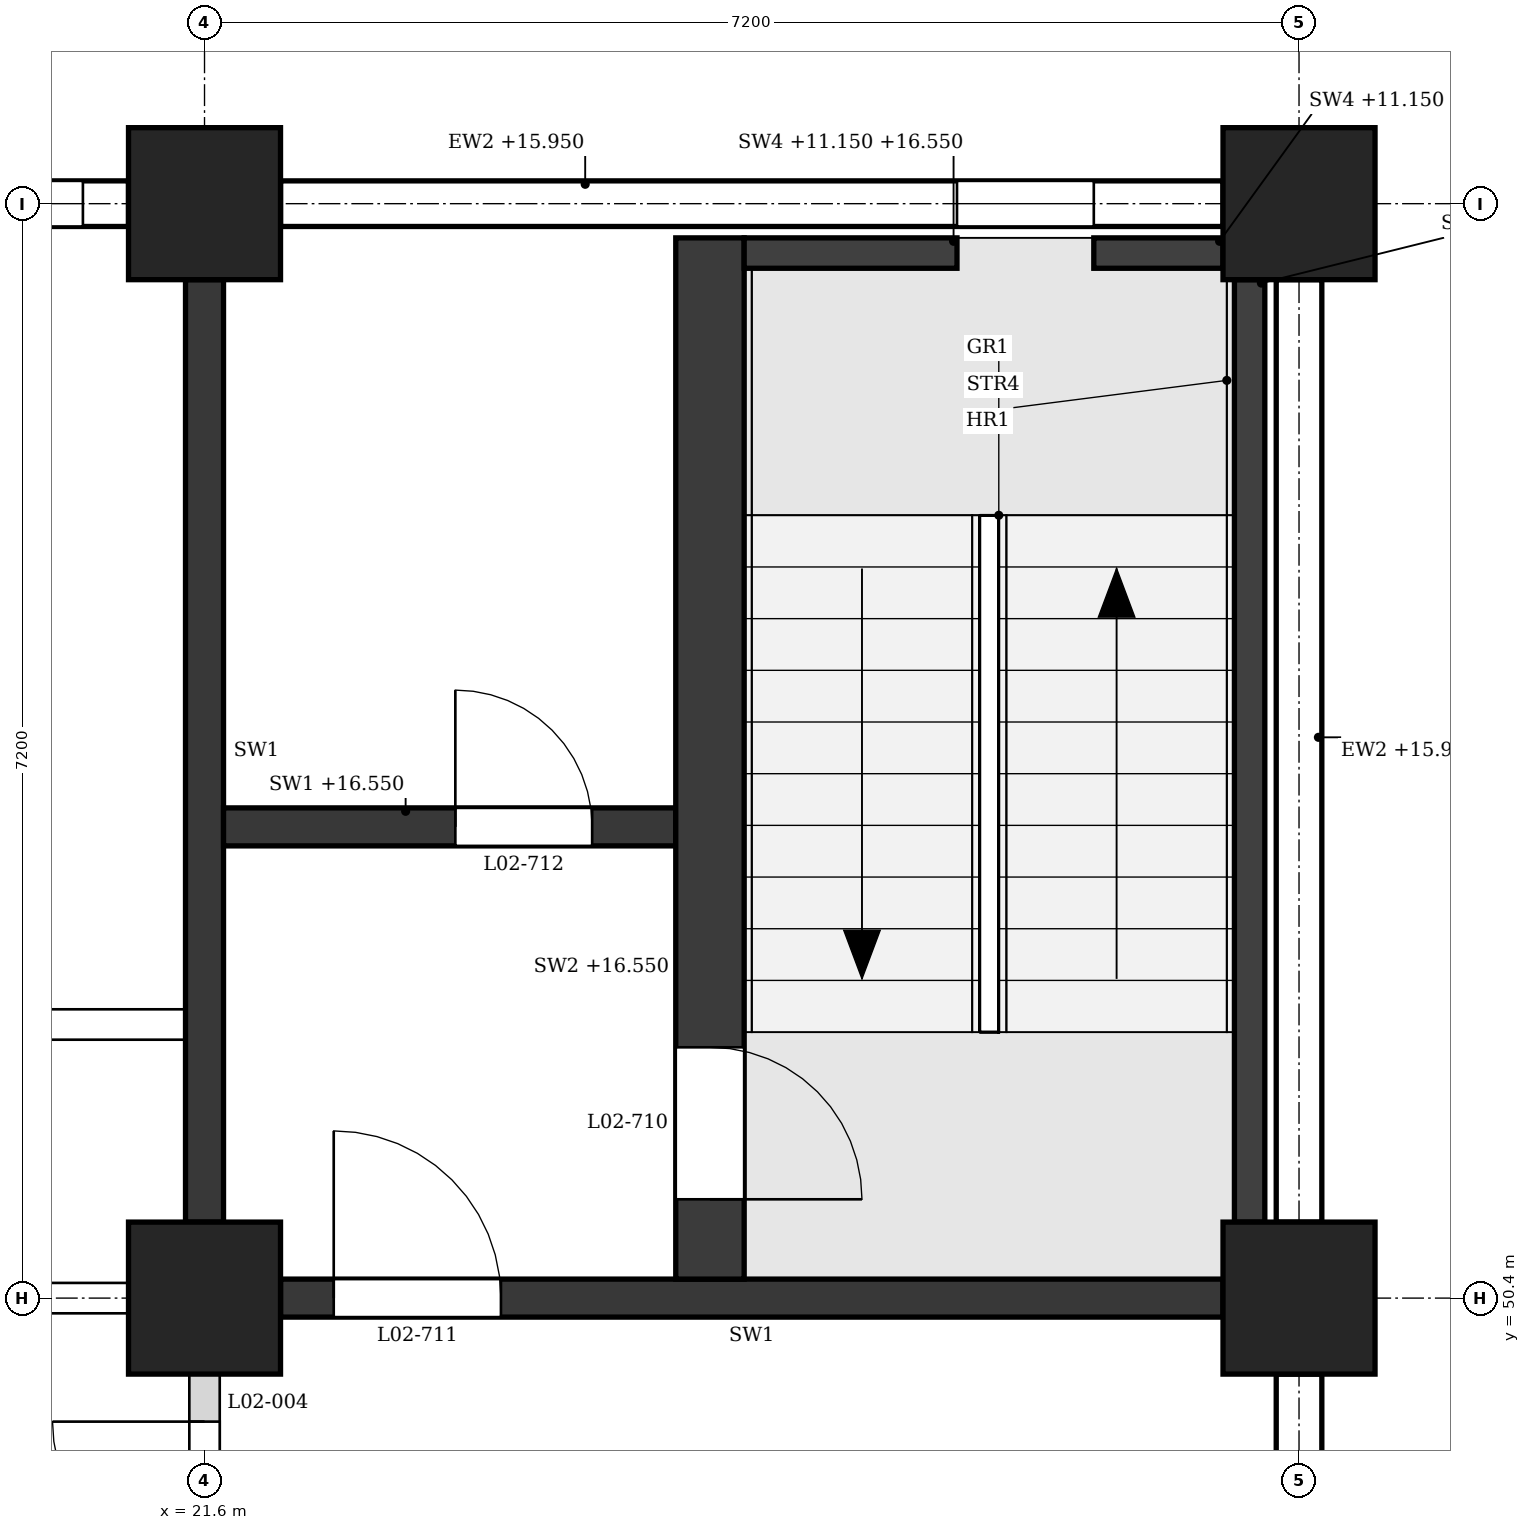
"""IFC4 building model, lengths in metres.
Left out: names, types, materials, properties, quantities, classifications, styles, units other than length and angle.
Written with IfcOpenShell. Run it as: python <this file> out.ifc"""

import sys

from ifc_helpers import new_model, si_unit, direction, frame, frame_2d, origin, origin_2d, place, context, subcontext, project, spatial, polyline, rectangle, outline, extrude, element, fill, save


model = new_model("IFC4")
c1 = context("Model", 3, precision=1e-05, world=origin(), true_north=direction((0.0, 1.0)))
c2 = subcontext(c1, "Body", "Model", "MODEL_VIEW")
j1 = project(units=[si_unit("LENGTHUNIT", "METRE"), si_unit("PLANEANGLEUNIT", "RADIAN")], contexts=[c1])
p1 = place(None, origin())
s1 = spatial("IfcSite", under=j1, at=p1, CompositionType="ELEMENT")
p2 = place(p1, origin())
s2 = spatial("IfcBuilding", under=s1, at=p2, CompositionType="ELEMENT")
p3 = place(p2, frame((0.0, 0.0, 11.4)))
s3 = spatial("IfcBuildingStorey", under=s2, at=p3, CompositionType="ELEMENT", Elevation=11.4)
for number, where, z_axis, x_axis in (
    (1, (21.6, 50.4, 0.0), (0.0, 0.0, 1.0), (1.0, 0.0, 0.0)),
    (2, (21.6, 57.6, 0.0), (0.0, 0.0, 1.0), (1.0, 0.0, 0.0)),
    (3, (28.8, 50.4, 0.0), (0.0, 0.0, 1.0), (1.0, 0.0, 0.0)),
    (4, (28.8, 57.6, 0.0), (0.0, 0.0, 1.0), (1.0, 0.0, 0.0)),
):
    element("IfcColumn", number, at=place(p3, frame(where, z_axis=z_axis, x_axis=x_axis)), inside=s3, PredefinedType="COLUMN", context=c2, shape_type="SweptSolid", body=[
        extrude(rectangle(XDim=1.0, YDim=1.0, at=origin_2d()), origin(), (0.0, 0.0, 1.0), 5.4),
    ])
p4 = place(p3, frame((28.3, 57.6, 0.0), z_axis=(0.0, 0.0, 1.0), x_axis=(-1.0, 0.0, 0.0)))
e5 = element("IfcWall", 5, at=p4, inside=s3, PredefinedType="STANDARD", context=c2, shape_type="SweptSolid", body=[
    extrude(rectangle(XDim=6.2, YDim=0.3, at=frame_2d((3.1, 0.0))), origin(), (0.0, 0.0, 1.0), 4.55),
])
p5 = place(p4, frame((0.85, 0.0, 0.9)))
e6 = element("IfcOpeningElement", 6, at=p5, cuts=e5, PredefinedType="OPENING", context=c2, shape_type="SweptSolid", body=[
    extrude(outline(polyline([(0.0, 0.0), (0.9, 0.0), (0.9, 2.65), (0.45, 3.1), (0.0, 2.65), (0.0, 0.0)])), frame((0.0, 0.16, 0.0), z_axis=(0.0, -1.0, 0.0), x_axis=(1.0, 0.0, 0.0)), (0.0, 0.0, 1.0), 0.32),
])
p6 = place(p3, frame((21.1, 57.6, 0.0), z_axis=(0.0, 0.0, 1.0), x_axis=(-1.0, 0.0, 0.0)))
e7 = element("IfcWall", 7, at=p6, inside=s3, PredefinedType="STANDARD", context=c2, shape_type="SweptSolid", body=[
    extrude(rectangle(XDim=6.2, YDim=0.3, at=frame_2d((3.1, 0.0))), origin(), (0.0, 0.0, 1.0), 4.55),
])
p7 = place(p6, frame((0.3, 0.0, 0.9)))
e8 = element("IfcOpeningElement", 8, at=p7, cuts=e7, PredefinedType="OPENING", context=c2, shape_type="SweptSolid", body=[
    extrude(outline(polyline([(0.0, 0.0), (0.85, 0.0), (0.85, 2.65), (0.425, 3.1), (0.0, 2.65), (0.0, 0.0)])), frame((0.0, 0.16, 0.0), z_axis=(0.0, -1.0, 0.0), x_axis=(1.0, 0.0, 0.0)), (0.0, 0.0, 1.0), 0.32),
])
p8 = place(p6, frame((1.45, 0.0, 0.9)))
e9 = element("IfcOpeningElement", 9, at=p8, cuts=e7, PredefinedType="OPENING", context=c2, shape_type="SweptSolid", body=[
    extrude(outline(polyline([(0.0, 0.0), (0.85, 0.0), (0.85, 2.65), (0.425, 3.1), (0.0, 2.65), (0.0, 0.0)])), frame((0.0, 0.16, 0.0), z_axis=(0.0, -1.0, 0.0), x_axis=(1.0, 0.0, 0.0)), (0.0, 0.0, 1.0), 0.32),
])
p9 = place(p6, frame((3.9, 0.0, 0.9)))
e10 = element("IfcOpeningElement", 10, at=p9, cuts=e7, PredefinedType="OPENING", context=c2, shape_type="SweptSolid", body=[
    extrude(outline(polyline([(0.0, 0.0), (0.85, 0.0), (0.85, 2.65), (0.425, 3.1), (0.0, 2.65), (0.0, 0.0)])), frame((0.0, 0.16, 0.0), z_axis=(0.0, -1.0, 0.0), x_axis=(1.0, 0.0, 0.0)), (0.0, 0.0, 1.0), 0.32),
])
p10 = place(p6, frame((5.05, 0.0, 0.9)))
e11 = element("IfcOpeningElement", 11, at=p10, cuts=e7, PredefinedType="OPENING", context=c2, shape_type="SweptSolid", body=[
    extrude(outline(polyline([(0.0, 0.0), (0.85, 0.0), (0.85, 2.65), (0.425, 3.1), (0.0, 2.65), (0.0, 0.0)])), frame((0.0, 0.16, 0.0), z_axis=(0.0, -1.0, 0.0), x_axis=(1.0, 0.0, 0.0)), (0.0, 0.0, 1.0), 0.32),
])
p11 = place(p3, frame((28.8, 43.7, 0.0), z_axis=(0.0, 0.0, 1.0), x_axis=(0.0, 1.0, 0.0)))
e12 = element("IfcWall", 12, at=p11, inside=s3, PredefinedType="STANDARD", context=c2, shape_type="SweptSolid", body=[
    extrude(rectangle(XDim=6.2, YDim=0.3, at=frame_2d((3.1, 0.0))), origin(), (0.0, 0.0, 1.0), 4.55),
])
p12 = place(p3, frame((28.8, 50.9, 0.0), z_axis=(0.0, 0.0, 1.0), x_axis=(0.0, 1.0, 0.0)))
e13 = element("IfcWall", 13, at=p12, inside=s3, PredefinedType="STANDARD", context=c2, shape_type="SweptSolid", body=[
    extrude(rectangle(XDim=6.2, YDim=0.3, at=frame_2d((3.1, 0.0))), origin(), (0.0, 0.0, 1.0), 4.55),
])
p13 = place(p3, frame((22.1, 50.4, 0.0), z_axis=(0.0, 0.0, 1.0), x_axis=(1.0, 0.0, 0.0)))
e14 = element("IfcWall", 14, at=p13, inside=s3, PredefinedType="SHEAR", context=c2, shape_type="SweptSolid", body=[
    extrude(rectangle(XDim=6.2, YDim=0.25, at=frame_2d((3.1, 0.0))), origin(), (0.0, 0.0, 1.0), 4.4),
])
p14 = place(p13, frame((0.35, 0.0, 0.0)))
e15 = element("IfcOpeningElement", 15, at=p14, cuts=e14, PredefinedType="OPENING", context=c2, shape_type="SweptSolid", body=[
    extrude(rectangle(XDim=1.1, YDim=2.1, at=frame_2d((0.55, 1.05))), frame((0.0, 0.135, 0.0), z_axis=(0.0, -1.0, 0.0), x_axis=(1.0, 0.0, 0.0)), (0.0, 0.0, 1.0), 0.27),
])
p15 = place(p3, frame((21.6, 50.9, 0.0), z_axis=(0.0, 0.0, 1.0), x_axis=(0.0, 1.0, 0.0)))
e16 = element("IfcWall", 16, at=p15, inside=s3, PredefinedType="SHEAR", context=c2, shape_type="SweptSolid", body=[
    extrude(rectangle(XDim=6.2, YDim=0.25, at=frame_2d((3.1, 0.0))), origin(), (0.0, 0.0, 1.0), 4.4),
])
p16 = place(p3, frame((28.475, 50.9, -0.25), z_axis=(0.0, 0.0, 1.0), x_axis=(0.0, 1.0, 0.0)))
e17 = element("IfcWall", 17, at=p16, inside=s3, PredefinedType="SHEAR", context=c2, shape_type="SweptSolid", body=[
    extrude(rectangle(XDim=6.2, YDim=0.2, at=frame_2d((3.1, 0.0))), origin(), (0.0, 0.0, 1.0), 5.4),
])
p17 = place(p3, frame((25.15, 57.275, -0.25), z_axis=(0.0, 0.0, 1.0), x_axis=(1.0, 0.0, 0.0)))
e18 = element("IfcWall", 18, at=p17, inside=s3, PredefinedType="SHEAR", context=c2, shape_type="SweptSolid", body=[
    extrude(rectangle(XDim=1.4, YDim=0.2, at=frame_2d((0.7, 0.0))), origin(), (0.0, 0.0, 1.0), 5.4),
])
p18 = place(p3, frame((27.45, 57.275, -0.25), z_axis=(0.0, 0.0, 1.0), x_axis=(1.0, 0.0, 0.0)))
e19 = element("IfcWall", 19, at=p18, inside=s3, PredefinedType="SHEAR", context=c2, shape_type="SweptSolid", body=[
    extrude(rectangle(XDim=0.85, YDim=0.2, at=frame_2d((0.425, 0.0))), origin(), (0.0, 0.0, 1.0), 5.4),
])
p19 = place(p3, frame((24.925, 50.525, 0.0), z_axis=(0.0, 0.0, 1.0), x_axis=(0.0, 1.0, 0.0)))
e20 = element("IfcWall", 20, at=p19, inside=s3, PredefinedType="SHEAR", context=c2, shape_type="SweptSolid", body=[
    extrude(rectangle(XDim=6.85, YDim=0.45, at=frame_2d((3.425, 0.0))), origin(), (0.0, 0.0, 1.0), 5.15),
])
p20 = place(p19, frame((0.525, 0.0, 0.0)))
e21 = element("IfcOpeningElement", 21, at=p20, cuts=e20, PredefinedType="OPENING", context=c2, shape_type="SweptSolid", body=[
    extrude(rectangle(XDim=1.0, YDim=2.1, at=frame_2d((0.5, 1.05))), frame((0.0, 0.235, 0.0), z_axis=(0.0, -1.0, 0.0), x_axis=(1.0, 0.0, 0.0)), (0.0, 0.0, 1.0), 0.47),
])
p21 = place(p3, frame((21.725, 53.5, 0.0), z_axis=(0.0, 0.0, 1.0), x_axis=(1.0, 0.0, 0.0)))
e22 = element("IfcWall", 22, at=p21, inside=s3, PredefinedType="SHEAR", context=c2, shape_type="SweptSolid", body=[
    extrude(rectangle(XDim=2.975, YDim=0.25, at=frame_2d((1.487, 0.0))), origin(), (0.0, 0.0, 1.0), 5.15),
])
p22 = place(p21, frame((1.525, 0.0, 0.0)))
e23 = element("IfcOpeningElement", 23, at=p22, cuts=e22, PredefinedType="OPENING", context=c2, shape_type="SweptSolid", body=[
    extrude(rectangle(XDim=0.9, YDim=2.1, at=frame_2d((0.45, 1.05))), frame((0.0, 0.135, 0.0), z_axis=(0.0, -1.0, 0.0), x_axis=(1.0, 0.0, 0.0)), (0.0, 0.0, 1.0), 0.27),
])
p23 = place(p3, frame((14.9, 50.4, 0.0), z_axis=(0.0, 0.0, 1.0), x_axis=(1.0, 0.0, 0.0)))
e24 = element("IfcWall", 24, at=p23, inside=s3, PredefinedType="PARTITIONING", context=c2, shape_type="SweptSolid", body=[
    extrude(rectangle(XDim=6.2, YDim=0.2, at=frame_2d((3.1, 0.0))), origin(), (0.0, 0.0, 1.0), 4.4),
])
p24 = place(p23, frame((4.15, 0.0, 0.0)))
e25 = element("IfcOpeningElement", 25, at=p24, cuts=e24, PredefinedType="OPENING", context=c2, shape_type="SweptSolid", body=[
    extrude(rectangle(XDim=1.0, YDim=2.1, at=frame_2d((0.5, 1.05))), frame((0.0, 0.11, 0.0), z_axis=(0.0, -1.0, 0.0), x_axis=(1.0, 0.0, 0.0)), (0.0, 0.0, 1.0), 0.22),
])
p25 = place(p3, frame((7.325, 52.2, 0.0), z_axis=(0.0, 0.0, 1.0), x_axis=(1.0, 0.0, 0.0)))
e26 = element("IfcWall", 26, at=p25, inside=s3, PredefinedType="PARTITIONING", context=c2, shape_type="SweptSolid", body=[
    extrude(outline(polyline([(0.0, 0.0), (14.15, 0.0), (14.15, 4.4), (14.025, 4.4), (14.025, 5.15), (7.325, 5.15), (7.325, 4.4), (6.825, 4.4), (6.825, 5.15), (0.125, 5.15), (0.125, 4.4), (0.0, 4.4), (0.0, 0.0)])), frame((0.0, 0.1, 0.0), z_axis=(0.0, -1.0, 0.0), x_axis=(1.0, 0.0, 0.0)), (0.0, 0.0, 1.0), 0.2),
])
p26 = place(p25, frame((1.238, 0.0, 0.0)))
e27 = element("IfcOpeningElement", 27, at=p26, cuts=e26, PredefinedType="OPENING", context=c2, shape_type="SweptSolid", body=[
    extrude(rectangle(XDim=1.0, YDim=2.1, at=frame_2d((0.5, 1.05))), frame((0.0, 0.11, 0.0), z_axis=(0.0, -1.0, 0.0), x_axis=(1.0, 0.0, 0.0)), (0.0, 0.0, 1.0), 0.22),
])
p27 = place(p25, frame((4.775, 0.0, 0.0)))
e28 = element("IfcOpeningElement", 28, at=p27, cuts=e26, PredefinedType="OPENING", context=c2, shape_type="SweptSolid", body=[
    extrude(rectangle(XDim=1.0, YDim=2.1, at=frame_2d((0.5, 1.05))), frame((0.0, 0.11, 0.0), z_axis=(0.0, -1.0, 0.0), x_axis=(1.0, 0.0, 0.0)), (0.0, 0.0, 1.0), 0.22),
])
p28 = place(p25, frame((8.375, 0.0, 0.0)))
e29 = element("IfcOpeningElement", 29, at=p28, cuts=e26, PredefinedType="OPENING", context=c2, shape_type="SweptSolid", body=[
    extrude(rectangle(XDim=1.0, YDim=2.1, at=frame_2d((0.5, 1.05))), frame((0.0, 0.11, 0.0), z_axis=(0.0, -1.0, 0.0), x_axis=(1.0, 0.0, 0.0)), (0.0, 0.0, 1.0), 0.22),
])
p29 = place(p25, frame((11.913, 0.0, 0.0)))
e30 = element("IfcOpeningElement", 30, at=p29, cuts=e26, PredefinedType="OPENING", context=c2, shape_type="SweptSolid", body=[
    extrude(rectangle(XDim=1.0, YDim=2.1, at=frame_2d((0.5, 1.05))), frame((0.0, 0.11, 0.0), z_axis=(0.0, -1.0, 0.0), x_axis=(1.0, 0.0, 0.0)), (0.0, 0.0, 1.0), 0.22),
])
p30 = place(p3, frame((21.6, 47.275, 0.0), z_axis=(0.0, 0.0, 1.0), x_axis=(0.0, 1.0, 0.0)))
e31 = element("IfcWall", 31, at=p30, inside=s3, PredefinedType="PARTITIONING", context=c2, shape_type="SweptSolid", body=[
    extrude(rectangle(XDim=2.625, YDim=0.2, at=frame_2d((1.312, 0.0))), origin(), (0.0, 0.0, 1.0), 4.4),
])
p31 = place(p30, frame((0.312, 0.0, 0.0)))
e32 = element("IfcOpeningElement", 32, at=p31, cuts=e31, PredefinedType="OPENING", context=c2, shape_type="SweptSolid", body=[
    extrude(rectangle(XDim=2.0, YDim=2.4, at=frame_2d((1.0, 1.2))), frame((0.0, 0.11, 0.0), z_axis=(0.0, -1.0, 0.0), x_axis=(1.0, 0.0, 0.0)), (0.0, 0.0, 1.0), 0.22),
])
p32 = place(p5, origin())
e33 = element("IfcWindow", 33, at=p32, inside=s3, PartitioningType="SINGLE_PANEL", PredefinedType="WINDOW", context=c2, shape_type="SweptSolid", body=[
    extrude(outline(polyline([(0.0, 0.0), (0.9, 0.0), (0.9, 2.65), (0.45, 3.1), (0.0, 2.65), (0.0, 0.0)])), frame((0.0, 0.03, 0.0), z_axis=(0.0, -1.0, 0.0), x_axis=(1.0, 0.0, 0.0)), (0.0, 0.0, 1.0), 0.06),
])
fill(e6, e33)
p33 = place(p7, origin())
e34 = element("IfcWindow", 34, at=p33, inside=s3, PartitioningType="SINGLE_PANEL", PredefinedType="WINDOW", context=c2, shape_type="SweptSolid", body=[
    extrude(outline(polyline([(0.0, 0.0), (0.85, 0.0), (0.85, 2.65), (0.425, 3.1), (0.0, 2.65), (0.0, 0.0)])), frame((0.0, 0.03, 0.0), z_axis=(0.0, -1.0, 0.0), x_axis=(1.0, 0.0, 0.0)), (0.0, 0.0, 1.0), 0.06),
])
fill(e8, e34)
p34 = place(p20, frame((1.0, 0.0, 0.0), z_axis=(0.0, 0.0, 1.0), x_axis=(-1.0, 0.0, 0.0)))
e35 = element("IfcDoor", 35, at=p34, inside=s3, OperationType="SINGLE_SWING_RIGHT", PredefinedType="DOOR", context=c2, shape_type="SweptSolid", body=[
    extrude(rectangle(XDim=1.0, YDim=2.1, at=frame_2d((0.5, 1.05))), frame((0.0, 0.025, 0.0), z_axis=(0.0, -1.0, 0.0), x_axis=(1.0, 0.0, 0.0)), (0.0, 0.0, 1.0), 0.05),
])
fill(e21, e35)
p35 = place(p14, origin())
e36 = element("IfcDoor", 36, at=p35, inside=s3, OperationType="SINGLE_SWING_LEFT", PredefinedType="DOOR", context=c2, shape_type="SweptSolid", body=[
    extrude(rectangle(XDim=1.1, YDim=2.1, at=frame_2d((0.55, 1.05))), frame((0.0, 0.025, 0.0), z_axis=(0.0, -1.0, 0.0), x_axis=(1.0, 0.0, 0.0)), (0.0, 0.0, 1.0), 0.05),
])
fill(e15, e36)
p36 = place(p22, origin())
e37 = element("IfcDoor", 37, at=p36, inside=s3, OperationType="SINGLE_SWING_LEFT", PredefinedType="DOOR", context=c2, shape_type="SweptSolid", body=[
    extrude(rectangle(XDim=0.9, YDim=2.1, at=frame_2d((0.45, 1.05))), frame((0.0, 0.025, 0.0), z_axis=(0.0, -1.0, 0.0), x_axis=(1.0, 0.0, 0.0)), (0.0, 0.0, 1.0), 0.05),
])
fill(e23, e37)
p37 = place(p31, origin())
e38 = element("IfcDoor", 38, at=p37, inside=s3, OperationType="DOUBLE_DOOR_SINGLE_SWING", PredefinedType="DOOR", context=c2, shape_type="SweptSolid", body=[
    extrude(rectangle(XDim=2.0, YDim=2.4, at=frame_2d((1.0, 1.2))), frame((0.0, 0.025, 0.0), z_axis=(0.0, -1.0, 0.0), x_axis=(1.0, 0.0, 0.0)), (0.0, 0.0, 1.0), 0.05),
])
fill(e32, e38)
save(model, sys.argv[1])
